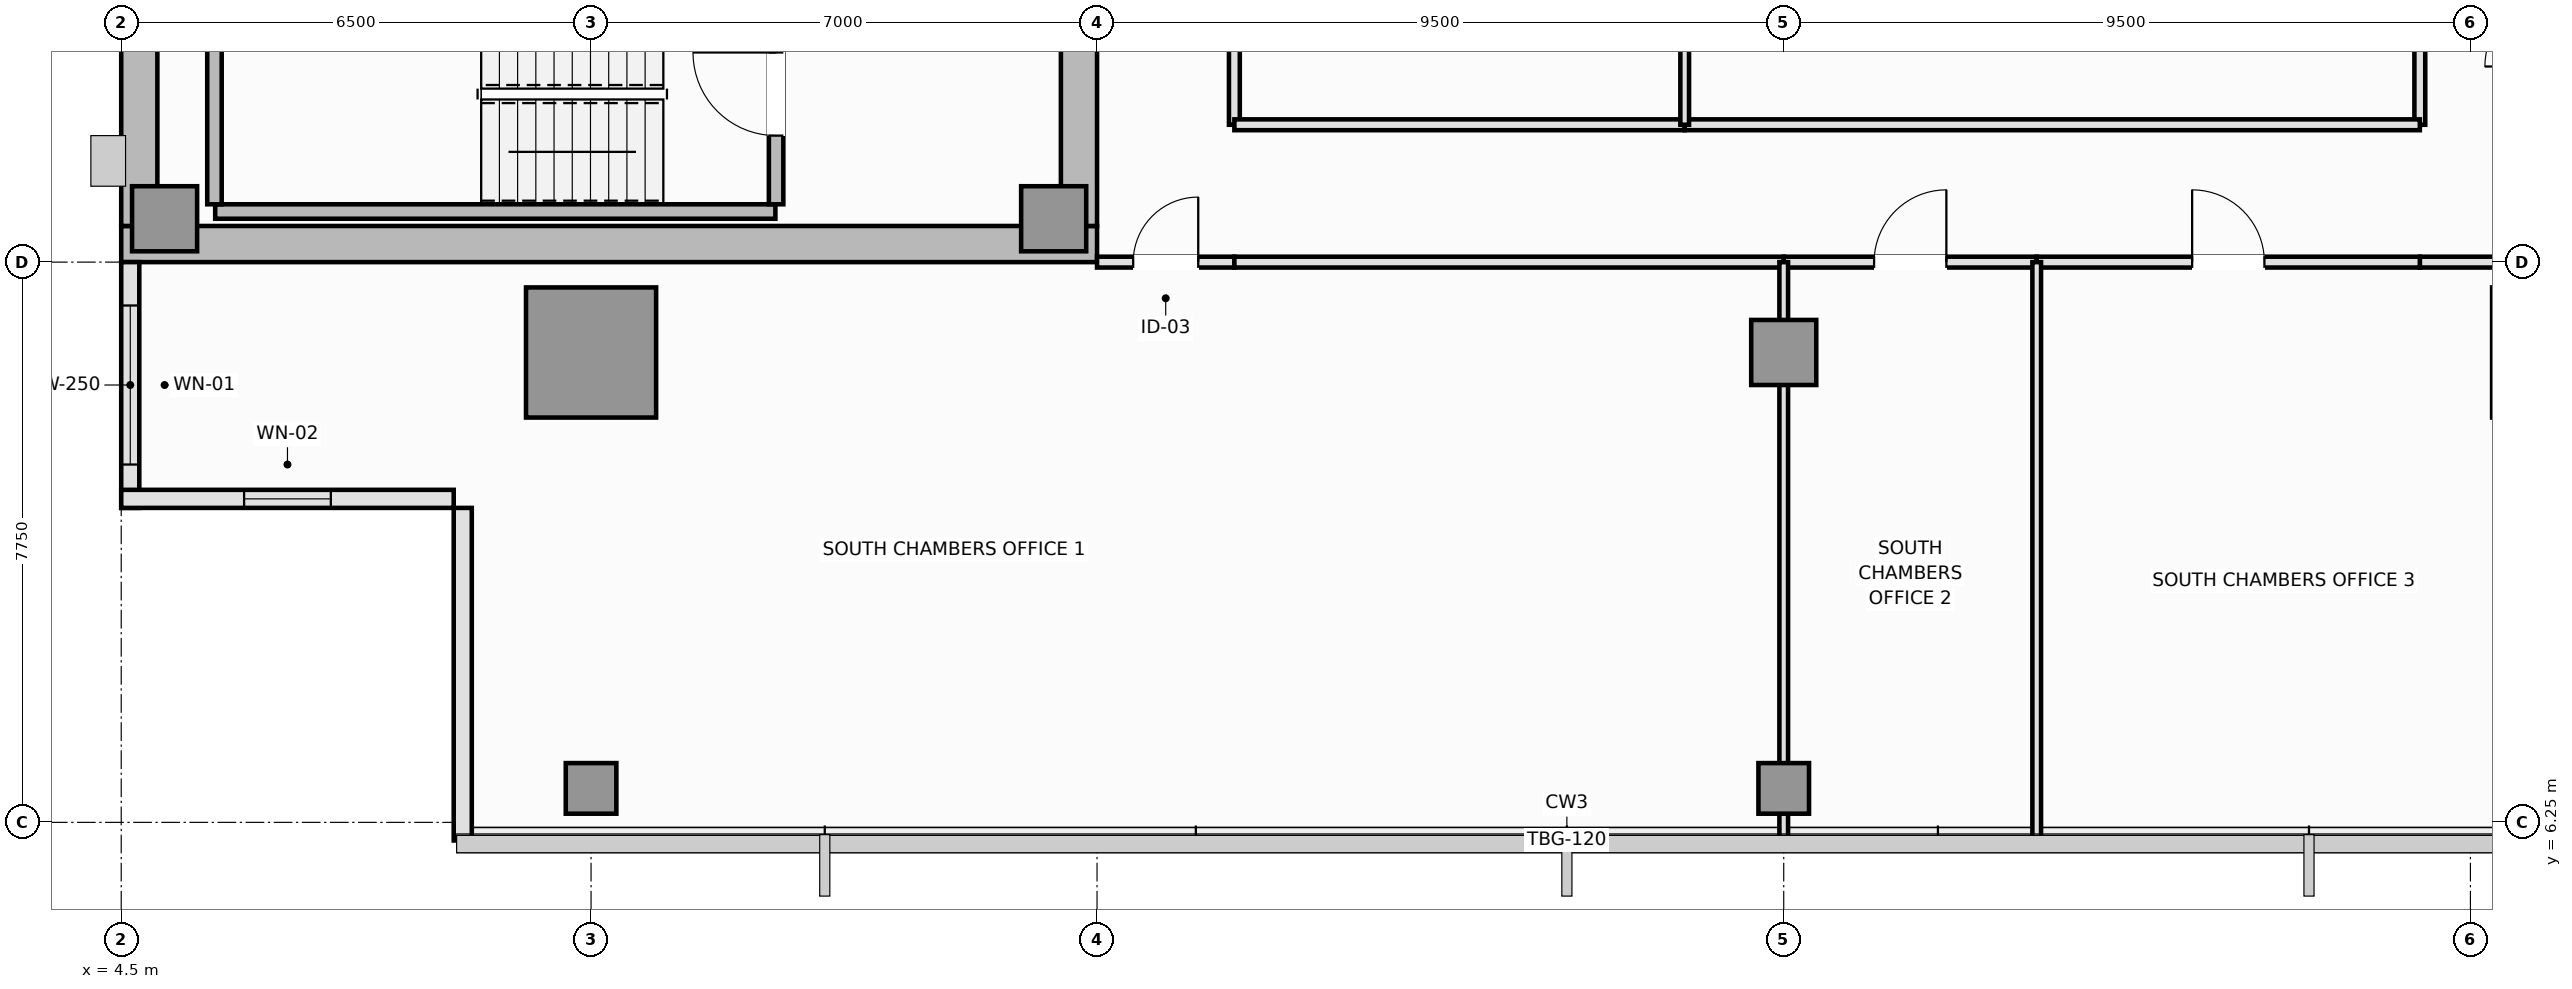
"""IFC4 building model, lengths in metres.
Left out: names, types, materials, properties, quantities, classifications, styles, units other than length and angle.
Written with IfcOpenShell. Run it as: python <this file> out.ifc"""

import sys

from ifc_helpers import new_model, si_unit, direction, frame, frame_2d, origin, origin_2d, place, context, subcontext, project, spatial, rectangle, extrude, element, fill, save


model = new_model("IFC4")
c1 = context("Model", 3, precision=1e-05, world=origin(), true_north=direction((0.0, 1.0)))
c2 = subcontext(c1, "Body", "Model", "MODEL_VIEW")
j1 = project(units=[si_unit("LENGTHUNIT", "METRE"), si_unit("PLANEANGLEUNIT", "RADIAN")], contexts=[c1])
p1 = place(None, origin())
s1 = spatial("IfcSite", under=j1, at=p1, CompositionType="ELEMENT")
p2 = place(p1, origin())
s2 = spatial("IfcBuilding", under=s1, at=p2, CompositionType="ELEMENT")
p3 = place(p2, frame((0.0, 0.0, 270.55)))
s3 = spatial("IfcBuildingStorey", under=s2, at=p3, CompositionType="ELEMENT", Elevation=270.55)
p4 = place(p3, frame((4.5, 14.25, 0.0), z_axis=(0.0, 0.0, 1.0), x_axis=(1.0, 0.0, 0.0)))
e1 = element("IfcWall", 1, at=p4, inside=s3, PredefinedType="SHEAR", context=c2, shape_type="SweptSolid", body=[
    extrude(rectangle(XDim=13.5, YDim=0.5, at=frame_2d((6.75, 0.0))), origin(), (0.0, 0.0, 1.0), 3.55),
])
p5 = place(p3, frame((4.75, 14.5, 0.0), z_axis=(0.0, 0.0, 1.0), x_axis=(0.0, 1.0, 0.0)))
e2 = element("IfcWall", 2, at=p5, inside=s3, PredefinedType="SHEAR", context=c2, shape_type="SweptSolid", body=[
    extrude(rectangle(XDim=21.5, YDim=0.5, at=frame_2d((10.75, 0.0))), origin(), (0.0, 0.0, 1.0), 3.55),
])
p6 = place(p3, frame((17.75, 14.5, 0.0), z_axis=(0.0, 0.0, 1.0), x_axis=(0.0, 1.0, 0.0)))
e3 = element("IfcWall", 3, at=p6, inside=s3, PredefinedType="SHEAR", context=c2, shape_type="SweptSolid", body=[
    extrude(rectangle(XDim=8.95, YDim=0.5, at=frame_2d((4.475, 0.0))), origin(), (0.0, 0.0, 1.0), 3.55),
])
p7 = place(p6, frame((4.4, 0.0, 0.0)))
e4 = element("IfcOpeningElement", 4, at=p7, cuts=e3, PredefinedType="OPENING", context=c2, shape_type="SweptSolid", body=[
    extrude(rectangle(XDim=1.1, YDim=2.15, at=frame_2d((0.55, 1.075))), frame((0.0, 0.26, 0.0), z_axis=(0.0, -1.0, 0.0), x_axis=(1.0, 0.0, 0.0)), (0.0, 0.0, 1.0), 0.52),
])
for number, where, z_axis, x_axis in (
    (5, (5.1, 14.6, 0.0), (0.0, 0.0, 1.0), (1.0, 0.0, 0.0)),
    (6, (17.4, 14.6, 0.0), (0.0, 0.0, 1.0), (1.0, 0.0, 0.0)),
):
    element("IfcColumn", number, at=place(p3, frame(where, z_axis=z_axis, x_axis=x_axis)), inside=s3, PredefinedType="PILASTER", context=c2, shape_type="SweptSolid", body=[
        extrude(rectangle(XDim=0.9, YDim=0.9, at=origin_2d()), origin(), (0.0, 0.0, 1.0), 3.55),
    ])
p8 = place(p3, frame((11.0, 12.75, 0.0), z_axis=(0.0, 0.0, 1.0), x_axis=(1.0, 0.0, 0.0)))
e7 = element("IfcColumn", 7, at=p8, inside=s3, PredefinedType="COLUMN", context=c2, shape_type="SweptSolid", body=[
    extrude(rectangle(XDim=1.8, YDim=1.8, at=origin_2d()), origin(), (0.0, 0.0, 1.0), 3.55),
])
p9 = place(p3, frame((27.5, 12.75, 0.0), z_axis=(0.0, 0.0, 1.0), x_axis=(1.0, 0.0, 0.0)))
e8 = element("IfcColumn", 8, at=p9, inside=s3, PredefinedType="COLUMN", context=c2, shape_type="SweptSolid", body=[
    extrude(rectangle(XDim=0.9, YDim=0.9, at=origin_2d()), origin(), (0.0, 0.0, 1.0), 3.55),
])
for number, where, z_axis, x_axis in (
    (9, (11.0, 6.72, 0.0), (0.0, 0.0, 1.0), (1.0, 0.0, 0.0)),
    (10, (27.5, 6.72, 0.0), (0.0, 0.0, 1.0), (1.0, 0.0, 0.0)),
):
    element("IfcColumn", number, at=place(p3, frame(where, z_axis=z_axis, x_axis=x_axis)), inside=s3, PredefinedType="COLUMN", context=c2, shape_type="SweptSolid", body=[
        extrude(rectangle(XDim=0.7, YDim=0.7, at=origin_2d()), origin(), (0.0, 0.0, 1.0), 3.55),
    ])
p10 = place(p3, frame((4.625, 14.0, 0.0), z_axis=(0.0, 0.0, 1.0), x_axis=(0.0, -1.0, 0.0)))
e11 = element("IfcWall", 11, at=p10, inside=s3, PredefinedType="SOLIDWALL", context=c2, shape_type="SweptSolid", body=[
    extrude(rectangle(XDim=3.4, YDim=0.25, at=frame_2d((1.7, 0.0))), origin(), (0.0, 0.0, 1.0), 3.39),
])
p11 = place(p10, frame((0.6, 0.0, 0.9)))
e12 = element("IfcOpeningElement", 12, at=p11, cuts=e11, PredefinedType="OPENING", context=c2, shape_type="SweptSolid", body=[
    extrude(rectangle(XDim=2.2, YDim=1.8, at=frame_2d((1.1, 0.9))), frame((0.0, 0.135, 0.0), z_axis=(0.0, -1.0, 0.0), x_axis=(1.0, 0.0, 0.0)), (0.0, 0.0, 1.0), 0.27),
])
p12 = place(p3, frame((4.5, 10.725, 0.0), z_axis=(0.0, 0.0, 1.0), x_axis=(1.0, 0.0, 0.0)))
e13 = element("IfcWall", 13, at=p12, inside=s3, PredefinedType="SOLIDWALL", context=c2, shape_type="SweptSolid", body=[
    extrude(rectangle(XDim=4.6, YDim=0.25, at=frame_2d((2.3, 0.0))), origin(), (0.0, 0.0, 1.0), 3.39),
])
p13 = place(p12, frame((1.7, 0.0, 0.9)))
e14 = element("IfcOpeningElement", 14, at=p13, cuts=e13, PredefinedType="OPENING", context=c2, shape_type="SweptSolid", body=[
    extrude(rectangle(XDim=1.2, YDim=1.8, at=frame_2d((0.6, 0.9))), frame((0.0, 0.135, 0.0), z_axis=(0.0, -1.0, 0.0), x_axis=(1.0, 0.0, 0.0)), (0.0, 0.0, 1.0), 0.27),
])
p14 = place(p3, frame((9.225, 10.6, 0.0), z_axis=(0.0, 0.0, 1.0), x_axis=(0.0, -1.0, 0.0)))
e15 = element("IfcWall", 15, at=p14, inside=s3, PredefinedType="SOLIDWALL", context=c2, shape_type="SweptSolid", body=[
    extrude(rectangle(XDim=4.6, YDim=0.25, at=frame_2d((2.3, 0.0))), origin(), (0.0, 0.0, 1.0), 3.39),
])
p15 = place(p3, frame((5.8, 14.7, 0.0), z_axis=(0.0, 0.0, 1.0), x_axis=(1.0, 0.0, 0.0)))
e16 = element("IfcWall", 16, at=p15, inside=s3, PredefinedType="SOLIDWALL", context=c2, shape_type="SweptSolid", body=[
    extrude(rectangle(XDim=7.75, YDim=0.2, at=frame_2d((3.875, 0.0))), origin(), (0.0, 0.0, 1.0), 3.55),
])
p16 = place(p3, frame((5.79, 14.8, 0.0), z_axis=(0.0, 0.0, 1.0), x_axis=(0.0, 1.0, 0.0)))
e17 = element("IfcWall", 17, at=p16, inside=s3, PredefinedType="SOLIDWALL", context=c2, shape_type="SweptSolid", body=[
    extrude(rectangle(XDim=3.05, YDim=0.2, at=frame_2d((1.525, 0.0))), origin(), (0.0, 0.0, 1.0), 3.55),
])
p17 = place(p3, frame((13.56, 14.8, 0.0), z_axis=(0.0, 0.0, 1.0), x_axis=(0.0, 1.0, 0.0)))
e18 = element("IfcWall", 18, at=p17, inside=s3, PredefinedType="SOLIDWALL", context=c2, shape_type="SweptSolid", body=[
    extrude(rectangle(XDim=3.05, YDim=0.2, at=frame_2d((1.525, 0.0))), origin(), (0.0, 0.0, 1.0), 3.55),
])
p18 = place(p17, frame((0.95, 0.0, 0.0)))
e19 = element("IfcOpeningElement", 19, at=p18, cuts=e18, PredefinedType="OPENING", context=c2, shape_type="SweptSolid", body=[
    extrude(rectangle(XDim=1.15, YDim=2.15, at=frame_2d((0.575, 1.075))), frame((0.0, 0.11, 0.0), z_axis=(0.0, -1.0, 0.0), x_axis=(1.0, 0.0, 0.0)), (0.0, 0.0, 1.0), 0.22),
])
p19 = place(p3, frame((19.9, 15.9, 0.0), z_axis=(0.0, 0.0, 1.0), x_axis=(0.0, 1.0, 0.0)))
e20 = element("IfcWall", 20, at=p19, inside=s3, PredefinedType="PARTITIONING", context=c2, shape_type="SweptSolid", body=[
    extrude(rectangle(XDim=4.3, YDim=0.15, at=frame_2d((2.15, 0.0))), origin(), (0.0, 0.0, 1.0), 3.39),
])
p20 = place(p19, frame((1.65, 0.0, 0.0)))
e21 = element("IfcOpeningElement", 21, at=p20, cuts=e20, PredefinedType="OPENING", context=c2, shape_type="SweptSolid", body=[
    extrude(rectangle(XDim=1.0, YDim=2.15, at=frame_2d((0.5, 1.075))), frame((0.0, 0.085, 0.0), z_axis=(0.0, -1.0, 0.0), x_axis=(1.0, 0.0, 0.0)), (0.0, 0.0, 1.0), 0.17),
])
p21 = place(p3, frame((18.0, 14.0, 0.0), z_axis=(0.0, 0.0, 1.0), x_axis=(1.0, 0.0, 0.0)))
e22 = element("IfcWall", 22, at=p21, inside=s3, PredefinedType="PARTITIONING", context=c2, shape_type="SweptSolid", body=[
    extrude(rectangle(XDim=1.9, YDim=0.15, at=frame_2d((0.95, 0.0))), origin(), (0.0, 0.0, 1.0), 3.39),
])
p22 = place(p21, frame((0.5, 0.0, 0.0)))
e23 = element("IfcOpeningElement", 23, at=p22, cuts=e22, PredefinedType="OPENING", context=c2, shape_type="SweptSolid", body=[
    extrude(rectangle(XDim=0.9, YDim=2.1, at=frame_2d((0.45, 1.05))), frame((0.0, 0.085, 0.0), z_axis=(0.0, -1.0, 0.0), x_axis=(1.0, 0.0, 0.0)), (0.0, 0.0, 1.0), 0.17),
])
p23 = place(p3, frame((36.3, 15.9, 0.0), z_axis=(0.0, 0.0, 1.0), x_axis=(0.0, 1.0, 0.0)))
e24 = element("IfcWall", 24, at=p23, inside=s3, PredefinedType="PARTITIONING", context=c2, shape_type="SweptSolid", body=[
    extrude(rectangle(XDim=4.3, YDim=0.15, at=frame_2d((2.15, 0.0))), origin(), (0.0, 0.0, 1.0), 3.39),
])
p24 = place(p23, frame((1.65, 0.0, 0.0)))
e25 = element("IfcOpeningElement", 25, at=p24, cuts=e24, PredefinedType="OPENING", context=c2, shape_type="SweptSolid", body=[
    extrude(rectangle(XDim=1.0, YDim=2.15, at=frame_2d((0.5, 1.075))), frame((0.0, 0.085, 0.0), z_axis=(0.0, -1.0, 0.0), x_axis=(1.0, 0.0, 0.0)), (0.0, 0.0, 1.0), 0.17),
])
p25 = place(p3, frame((36.3, 14.0, 0.0), z_axis=(0.0, 0.0, 1.0), x_axis=(1.0, 0.0, 0.0)))
e26 = element("IfcWall", 26, at=p25, inside=s3, PredefinedType="PARTITIONING", context=c2, shape_type="SweptSolid", body=[
    extrude(rectangle(XDim=1.9, YDim=0.15, at=frame_2d((0.95, 0.0))), origin(), (0.0, 0.0, 1.0), 3.39),
])
p26 = place(p3, frame((19.9, 15.9, 0.0), z_axis=(0.0, 0.0, 1.0), x_axis=(1.0, 0.0, 0.0)))
e27 = element("IfcWall", 27, at=p26, inside=s3, PredefinedType="PARTITIONING", context=c2, shape_type="SweptSolid", body=[
    extrude(rectangle(XDim=6.23, YDim=0.15, at=frame_2d((3.115, 0.0))), origin(), (0.0, 0.0, 1.0), 3.39),
])
p27 = place(p3, frame((26.13, 15.9, 0.0), z_axis=(0.0, 0.0, 1.0), x_axis=(1.0, 0.0, 0.0)))
e28 = element("IfcWall", 28, at=p27, inside=s3, PredefinedType="PARTITIONING", context=c2, shape_type="SweptSolid", body=[
    extrude(rectangle(XDim=10.17, YDim=0.15, at=frame_2d((5.085, 0.0))), origin(), (0.0, 0.0, 1.0), 3.39),
])
p28 = place(p3, frame((19.9, 14.0, 0.0), z_axis=(0.0, 0.0, 1.0), x_axis=(1.0, 0.0, 0.0)))
e29 = element("IfcWall", 29, at=p28, inside=s3, PredefinedType="PARTITIONING", context=c2, shape_type="SweptSolid", body=[
    extrude(rectangle(XDim=7.6, YDim=0.15, at=frame_2d((3.8, 0.0))), origin(), (0.0, 0.0, 1.0), 3.39),
])
p29 = place(p3, frame((27.5, 14.0, 0.0), z_axis=(0.0, 0.0, 1.0), x_axis=(1.0, 0.0, 0.0)))
e30 = element("IfcWall", 30, at=p29, inside=s3, PredefinedType="PARTITIONING", context=c2, shape_type="SweptSolid", body=[
    extrude(rectangle(XDim=3.5, YDim=0.15, at=frame_2d((1.75, 0.0))), origin(), (0.0, 0.0, 1.0), 3.39),
])
p30 = place(p29, frame((1.25, 0.0, 0.0)))
e31 = element("IfcOpeningElement", 31, at=p30, cuts=e30, PredefinedType="OPENING", context=c2, shape_type="SweptSolid", body=[
    extrude(rectangle(XDim=1.0, YDim=2.15, at=frame_2d((0.5, 1.075))), frame((0.0, 0.085, 0.0), z_axis=(0.0, -1.0, 0.0), x_axis=(1.0, 0.0, 0.0)), (0.0, 0.0, 1.0), 0.17),
])
p31 = place(p3, frame((31.0, 14.0, 0.0), z_axis=(0.0, 0.0, 1.0), x_axis=(1.0, 0.0, 0.0)))
e32 = element("IfcWall", 32, at=p31, inside=s3, PredefinedType="PARTITIONING", context=c2, shape_type="SweptSolid", body=[
    extrude(rectangle(XDim=5.3, YDim=0.15, at=frame_2d((2.65, 0.0))), origin(), (0.0, 0.0, 1.0), 3.39),
])
p32 = place(p31, frame((2.15, 0.0, 0.0)))
e33 = element("IfcOpeningElement", 33, at=p32, cuts=e32, PredefinedType="OPENING", context=c2, shape_type="SweptSolid", body=[
    extrude(rectangle(XDim=1.0, YDim=2.15, at=frame_2d((0.5, 1.075))), frame((0.0, 0.085, 0.0), z_axis=(0.0, -1.0, 0.0), x_axis=(1.0, 0.0, 0.0)), (0.0, 0.0, 1.0), 0.17),
])
p33 = place(p3, frame((26.13, 15.9, 0.0), z_axis=(0.0, 0.0, 1.0), x_axis=(0.0, 1.0, 0.0)))
e34 = element("IfcWall", 34, at=p33, inside=s3, PredefinedType="PARTITIONING", context=c2, shape_type="SweptSolid", body=[
    extrude(rectangle(XDim=4.3, YDim=0.12, at=frame_2d((2.15, 0.0))), origin(), (0.0, 0.0, 1.0), 3.39),
])
p34 = place(p3, frame((27.5, 6.01, 0.0), z_axis=(0.0, 0.0, 1.0), x_axis=(0.0, 1.0, 0.0)))
e35 = element("IfcWall", 35, at=p34, inside=s3, PredefinedType="PARTITIONING", context=c2, shape_type="SweptSolid", body=[
    extrude(rectangle(XDim=7.99, YDim=0.12, at=frame_2d((3.995, 0.0))), origin(), (0.0, 0.0, 1.0), 2.99),
])
p35 = place(p3, frame((31.0, 6.01, 0.0), z_axis=(0.0, 0.0, 1.0), x_axis=(0.0, 1.0, 0.0)))
e36 = element("IfcWall", 36, at=p35, inside=s3, PredefinedType="PARTITIONING", context=c2, shape_type="SweptSolid", body=[
    extrude(rectangle(XDim=7.99, YDim=0.12, at=frame_2d((3.995, 0.0))), origin(), (0.0, 0.0, 1.0), 3.39),
])
p36 = place(p11, origin())
e37 = element("IfcWindow", 37, at=p36, inside=s3, PartitioningType="SINGLE_PANEL", PredefinedType="WINDOW", context=c2, shape_type="SweptSolid", body=[
    extrude(rectangle(XDim=2.2, YDim=1.8, at=frame_2d((1.1, 0.9))), frame((0.0, 0.03, 0.0), z_axis=(0.0, -1.0, 0.0), x_axis=(1.0, 0.0, 0.0)), (0.0, 0.0, 1.0), 0.06),
])
fill(e12, e37)
p37 = place(p13, origin())
e38 = element("IfcWindow", 38, at=p37, inside=s3, PartitioningType="SINGLE_PANEL", PredefinedType="WINDOW", context=c2, shape_type="SweptSolid", body=[
    extrude(rectangle(XDim=1.2, YDim=1.8, at=frame_2d((0.6, 0.9))), frame((0.0, 0.03, 0.0), z_axis=(0.0, -1.0, 0.0), x_axis=(1.0, 0.0, 0.0)), (0.0, 0.0, 1.0), 0.06),
])
fill(e14, e38)
p38 = place(p18, origin())
e39 = element("IfcDoor", 39, at=p38, inside=s3, OperationType="SINGLE_SWING_RIGHT", PredefinedType="DOOR", context=c2, shape_type="SweptSolid", body=[
    extrude(rectangle(XDim=1.15, YDim=2.15, at=frame_2d((0.575, 1.075))), frame((0.0, 0.025, 0.0), z_axis=(0.0, -1.0, 0.0), x_axis=(1.0, 0.0, 0.0)), (0.0, 0.0, 1.0), 0.05),
])
fill(e19, e39)
p39 = place(p22, origin())
e40 = element("IfcDoor", 40, at=p39, inside=s3, OperationType="SINGLE_SWING_RIGHT", PredefinedType="DOOR", context=c2, shape_type="SweptSolid", body=[
    extrude(rectangle(XDim=0.9, YDim=2.1, at=frame_2d((0.45, 1.05))), frame((0.0, 0.025, 0.0), z_axis=(0.0, -1.0, 0.0), x_axis=(1.0, 0.0, 0.0)), (0.0, 0.0, 1.0), 0.05),
])
fill(e23, e40)
p40 = place(p30, origin())
e41 = element("IfcDoor", 41, at=p40, inside=s3, OperationType="SINGLE_SWING_RIGHT", PredefinedType="DOOR", context=c2, shape_type="SweptSolid", body=[
    extrude(rectangle(XDim=1.0, YDim=2.15, at=frame_2d((0.5, 1.075))), frame((0.0, 0.025, 0.0), z_axis=(0.0, -1.0, 0.0), x_axis=(1.0, 0.0, 0.0)), (0.0, 0.0, 1.0), 0.05),
])
fill(e31, e41)
p41 = place(p32, origin())
e42 = element("IfcDoor", 42, at=p41, inside=s3, OperationType="SINGLE_SWING_LEFT", PredefinedType="DOOR", context=c2, shape_type="SweptSolid", body=[
    extrude(rectangle(XDim=1.0, YDim=2.15, at=frame_2d((0.5, 1.075))), frame((0.0, 0.025, 0.0), z_axis=(0.0, -1.0, 0.0), x_axis=(1.0, 0.0, 0.0)), (0.0, 0.0, 1.0), 0.05),
])
fill(e33, e42)
save(model, sys.argv[1])
